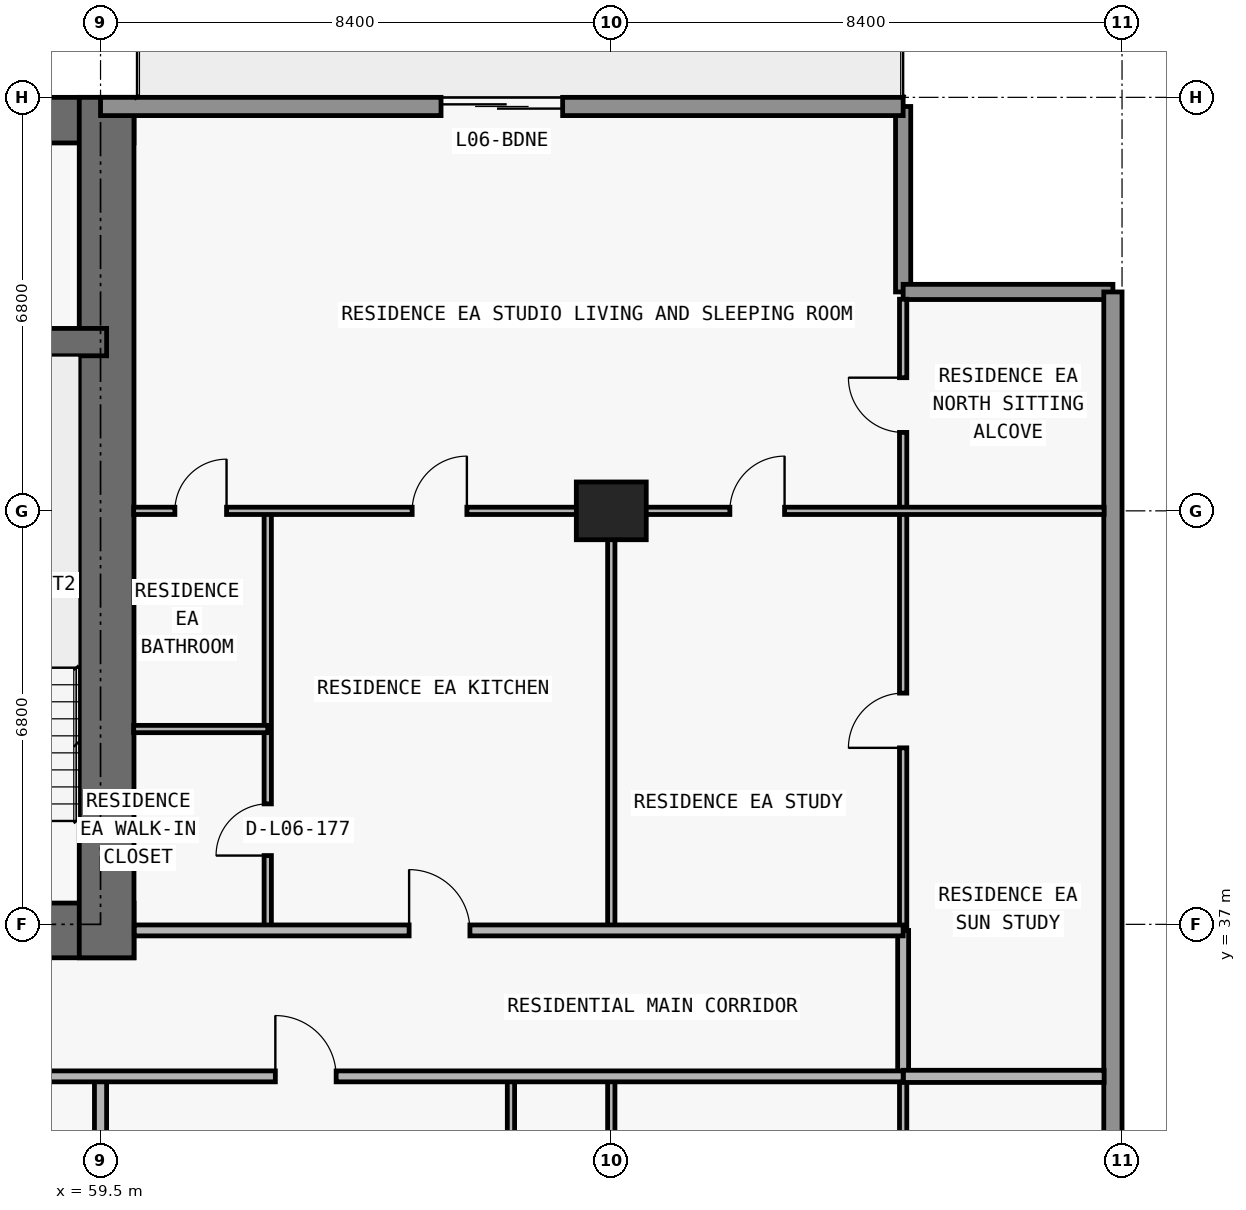
"""IFC4 building model, lengths in metres.
Left out: names, types, materials, properties, quantities, classifications, styles, units other than length and angle.
Written with IfcOpenShell. Run it as: python <this file> out.ifc"""

import sys

from ifc_helpers import new_model, si_unit, direction, frame, frame_2d, origin, origin_2d, place, context, subcontext, project, spatial, rectangle, extrude, element, fill, save


model = new_model("IFC4")
c1 = context("Model", 3, precision=1e-05, world=origin(), true_north=direction((0.0, 1.0)))
c2 = subcontext(c1, "Body", "Model", "MODEL_VIEW")
j1 = project(units=[si_unit("LENGTHUNIT", "METRE"), si_unit("PLANEANGLEUNIT", "RADIAN")], contexts=[c1])
p1 = place(None, origin())
s1 = spatial("IfcSite", under=j1, at=p1, CompositionType="ELEMENT")
p2 = place(p1, origin())
s2 = spatial("IfcBuilding", under=s1, at=p2, CompositionType="ELEMENT")
p3 = place(p2, frame((0.0, 0.0, 30.0)))
s3 = spatial("IfcBuildingStorey", under=s2, at=p3, CompositionType="ELEMENT", Elevation=30.0)
p4 = place(p3, frame((67.9, 43.8, 0.0), z_axis=(0.0, 0.0, 1.0), x_axis=(1.0, 0.0, 0.0)))
e1 = element("IfcColumn", 1, at=p4, inside=s3, PredefinedType="COLUMN", context=c2, shape_type="SweptSolid", body=[
    extrude(rectangle(XDim=1.15, YDim=0.95, at=origin_2d()), origin(), (0.0, 0.0, 1.0), 3.05),
])
p5 = place(p3, frame((17.75, 36.9, 0.0), z_axis=(0.0, 0.0, 1.0), x_axis=(1.0, 0.0, 0.0)))
e2 = element("IfcWall", 2, at=p5, inside=s3, PredefinedType="SHEAR", context=c2, shape_type="SweptSolid", body=[
    extrude(rectangle(XDim=42.3, YDim=0.9, at=frame_2d((21.15, 0.0))), origin(), (0.0, 0.0, 1.0), 3.05),
])
p6 = place(p5, frame((14.55, 0.0, 0.0)))
e3 = element("IfcOpeningElement", 3, at=p6, cuts=e2, PredefinedType="OPENING", context=c2, shape_type="SweptSolid", body=[
    extrude(rectangle(XDim=1.1, YDim=2.15, at=frame_2d((0.55, 1.075))), frame((0.0, 0.46, 0.0), z_axis=(0.0, -1.0, 0.0), x_axis=(1.0, 0.0, 0.0)), (0.0, 0.0, 1.0), 0.92),
])
p7 = place(p5, frame((6.4, 0.0, 0.0)))
e4 = element("IfcOpeningElement", 4, at=p7, cuts=e2, PredefinedType="OPENING", context=c2, shape_type="SweptSolid", body=[
    extrude(rectangle(XDim=1.05, YDim=2.15, at=frame_2d((0.525, 1.075))), frame((0.0, 0.46, 0.0), z_axis=(0.0, -1.0, 0.0), x_axis=(1.0, 0.0, 0.0)), (0.0, 0.0, 1.0), 0.92),
])
p8 = place(p5, frame((34.9, 0.0, 0.0)))
e5 = element("IfcOpeningElement", 5, at=p8, cuts=e2, PredefinedType="OPENING", context=c2, shape_type="SweptSolid", body=[
    extrude(rectangle(XDim=1.05, YDim=2.15, at=frame_2d((0.525, 1.075))), frame((0.0, 0.46, 0.0), z_axis=(0.0, -1.0, 0.0), x_axis=(1.0, 0.0, 0.0)), (0.0, 0.0, 1.0), 0.92),
])
p9 = place(p5, frame((11.012, 0.0, 0.0)))
e6 = element("IfcOpeningElement", 6, at=p9, cuts=e2, PredefinedType="OPENING", context=c2, shape_type="SweptSolid", body=[
    extrude(rectangle(XDim=1.05, YDim=2.15, at=frame_2d((0.525, 1.075))), frame((0.0, 0.46, 0.0), z_axis=(0.0, -1.0, 0.0), x_axis=(1.0, 0.0, 0.0)), (0.0, 0.0, 1.0), 0.92),
])
p10 = place(p5, frame((24.25, 0.0, 0.0)))
e7 = element("IfcOpeningElement", 7, at=p10, cuts=e2, PredefinedType="OPENING", context=c2, shape_type="SweptSolid", body=[
    extrude(rectangle(XDim=1.05, YDim=2.15, at=frame_2d((0.525, 1.075))), frame((0.0, 0.46, 0.0), z_axis=(0.0, -1.0, 0.0), x_axis=(1.0, 0.0, 0.0)), (0.0, 0.0, 1.0), 0.92),
])
p11 = place(p3, frame((17.75, 50.225, 0.0), z_axis=(0.0, 0.0, 1.0), x_axis=(1.0, 0.0, 0.0)))
e8 = element("IfcWall", 8, at=p11, inside=s3, PredefinedType="SHEAR", context=c2, shape_type="SweptSolid", body=[
    extrude(rectangle(XDim=42.3, YDim=0.75, at=frame_2d((21.15, 0.0))), origin(), (0.0, 0.0, 1.0), 3.05),
])
p12 = place(p3, frame((59.6, 36.45, 0.0), z_axis=(0.0, 0.0, 1.0), x_axis=(0.0, 1.0, 0.0)))
e9 = element("IfcWall", 9, at=p12, inside=s3, PredefinedType="SHEAR", context=c2, shape_type="SweptSolid", body=[
    extrude(rectangle(XDim=14.15, YDim=0.9, at=frame_2d((7.075, 0.0))), origin(), (0.0, 0.0, 1.0), 3.05),
])
p13 = place(p3, frame((18.2, 46.575, 0.0), z_axis=(0.0, 0.0, 1.0), x_axis=(1.0, 0.0, 0.0)))
e10 = element("IfcWall", 10, at=p13, inside=s3, PredefinedType="SHEAR", context=c2, shape_type="SweptSolid", body=[
    extrude(rectangle(XDim=41.4, YDim=0.45, at=frame_2d((20.7, 0.0))), origin(), (0.0, 0.0, 1.0), 3.05),
])
p14 = place(p13, frame((7.675, 0.0, 0.0)))
e11 = element("IfcOpeningElement", 11, at=p14, cuts=e10, PredefinedType="OPENING", context=c2, shape_type="SweptSolid", body=[
    extrude(rectangle(XDim=1.05, YDim=2.15, at=frame_2d((0.525, 1.075))), frame((0.0, 0.235, 0.0), z_axis=(0.0, -1.0, 0.0), x_axis=(1.0, 0.0, 0.0)), (0.0, 0.0, 1.0), 0.47),
])
p15 = place(p13, frame((32.725, 0.0, 0.0)))
e12 = element("IfcOpeningElement", 12, at=p15, cuts=e10, PredefinedType="OPENING", context=c2, shape_type="SweptSolid", body=[
    extrude(rectangle(XDim=1.05, YDim=2.15, at=frame_2d((0.525, 1.075))), frame((0.0, 0.235, 0.0), z_axis=(0.0, -1.0, 0.0), x_axis=(1.0, 0.0, 0.0)), (0.0, 0.0, 1.0), 0.47),
])
p16 = place(p3, frame((72.7, 50.45, 0.0), z_axis=(0.0, 0.0, 1.0), x_axis=(0.0, -1.0, 0.0)))
e13 = element("IfcWall", 13, at=p16, inside=s3, PredefinedType="ELEMENTEDWALL", context=c2, shape_type="SweptSolid", body=[
    extrude(rectangle(XDim=3.05, YDim=0.25, at=frame_2d((1.525, 0.0))), origin(), (0.0, 0.0, 1.0), 3.05),
])
p17 = place(p3, frame((72.7, 47.4, 0.0), z_axis=(0.0, 0.0, 1.0), x_axis=(1.0, 0.0, 0.0)))
e14 = element("IfcWall", 14, at=p17, inside=s3, PredefinedType="ELEMENTEDWALL", context=c2, shape_type="SweptSolid", body=[
    extrude(rectangle(XDim=3.45, YDim=0.25, at=frame_2d((1.725, 0.0))), origin(), (0.0, 0.0, 1.0), 3.05),
])
p18 = place(p3, frame((76.15, 47.4, 0.0), z_axis=(0.0, 0.0, 1.0), x_axis=(0.0, -1.0, 0.0)))
e15 = element("IfcWall", 15, at=p18, inside=s3, PredefinedType="STANDARD", context=c2, shape_type="SweptSolid", body=[
    extrude(rectangle(XDim=20.6, YDim=0.3, at=frame_2d((10.3, 0.0))), origin(), (0.0, 0.0, 1.0), 3.05),
])
p19 = place(p3, frame((59.5, 50.45, 0.0), z_axis=(0.0, 0.0, 1.0), x_axis=(1.0, 0.0, 0.0)))
e16 = element("IfcWall", 16, at=p19, inside=s3, PredefinedType="STANDARD", context=c2, shape_type="SweptSolid", body=[
    extrude(rectangle(XDim=13.2, YDim=0.3, at=frame_2d((6.6, 0.0))), origin(), (0.0, 0.0, 1.0), 3.05),
])
p20 = place(p19, frame((5.6, 0.0, 0.0)))
e17 = element("IfcOpeningElement", 17, at=p20, cuts=e16, PredefinedType="OPENING", context=c2, shape_type="SweptSolid", body=[
    extrude(rectangle(XDim=2.0, YDim=2.3, at=frame_2d((1.0, 1.15))), frame((0.0, 0.16, 0.0), z_axis=(0.0, -1.0, 0.0), x_axis=(1.0, 0.0, 0.0)), (0.0, 0.0, 1.0), 0.32),
])
p21 = place(p3, frame((59.5, 27.64, 0.0), z_axis=(0.0, 0.0, 1.0), x_axis=(0.0, 1.0, 0.0)))
e18 = element("IfcWall", 18, at=p21, inside=s3, PredefinedType="PARTITIONING", context=c2, shape_type="SweptSolid", body=[
    extrude(rectangle(XDim=6.86, YDim=0.2, at=frame_2d((3.43, 0.0))), origin(), (0.0, 0.0, 1.0), 2.11),
])
p22 = place(p3, frame((62.25, 36.9, 0.0), z_axis=(0.0, 0.0, 1.0), x_axis=(0.0, 1.0, 0.0)))
e19 = element("IfcWall", 19, at=p22, inside=s3, PredefinedType="PARTITIONING", context=c2, shape_type="SweptSolid", body=[
    extrude(rectangle(XDim=6.9, YDim=0.12, at=frame_2d((3.45, 0.0))), origin(), (0.0, 0.0, 1.0), 3.05),
])
p23 = place(p22, frame((1.231, 0.0, 0.0)))
e20 = element("IfcOpeningElement", 20, at=p23, cuts=e19, PredefinedType="OPENING", context=c2, shape_type="SweptSolid", body=[
    extrude(rectangle(XDim=0.85, YDim=2.1, at=frame_2d((0.425, 1.05))), frame((0.0, 0.07, 0.0), z_axis=(0.0, -1.0, 0.0), x_axis=(1.0, 0.0, 0.0)), (0.0, 0.0, 1.0), 0.14),
])
p24 = place(p3, frame((66.25, 27.64, 0.0), z_axis=(0.0, 0.0, 1.0), x_axis=(0.0, 1.0, 0.0)))
e21 = element("IfcWall", 21, at=p24, inside=s3, PredefinedType="PARTITIONING", context=c2, shape_type="SweptSolid", body=[
    extrude(rectangle(XDim=6.86, YDim=0.12, at=frame_2d((3.43, 0.0))), origin(), (0.0, 0.0, 1.0), 3.05),
])
p25 = place(p24, frame((3.005, 0.0, 0.0)))
e22 = element("IfcOpeningElement", 22, at=p25, cuts=e21, PredefinedType="OPENING", context=c2, shape_type="SweptSolid", body=[
    extrude(rectangle(XDim=0.85, YDim=2.1, at=frame_2d((0.425, 1.05))), frame((0.0, 0.07, 0.0), z_axis=(0.0, -1.0, 0.0), x_axis=(1.0, 0.0, 0.0)), (0.0, 0.0, 1.0), 0.14),
])
p26 = place(p3, frame((67.9, 27.64, 0.0), z_axis=(0.0, 0.0, 1.0), x_axis=(0.0, 1.0, 0.0)))
e23 = element("IfcWall", 23, at=p26, inside=s3, PredefinedType="PARTITIONING", context=c2, shape_type="SweptSolid", body=[
    extrude(rectangle(XDim=6.86, YDim=0.12, at=frame_2d((3.43, 0.0))), origin(), (0.0, 0.0, 1.0), 2.11),
])
p27 = place(p3, frame((67.9, 36.9, 0.0), z_axis=(0.0, 0.0, 1.0), x_axis=(0.0, 1.0, 0.0)))
e24 = element("IfcWall", 24, at=p27, inside=s3, PredefinedType="PARTITIONING", context=c2, shape_type="SweptSolid", body=[
    extrude(rectangle(XDim=6.9, YDim=0.12, at=frame_2d((3.45, 0.0))), origin(), (0.0, 0.0, 1.0), 2.11),
])
p28 = place(p3, frame((72.7, 27.64, 0.0), z_axis=(0.0, 0.0, 1.0), x_axis=(0.0, 1.0, 0.0)))
e25 = element("IfcWall", 25, at=p28, inside=s3, PredefinedType="PARTITIONING", context=c2, shape_type="SweptSolid", body=[
    extrude(rectangle(XDim=6.86, YDim=0.12, at=frame_2d((3.43, 0.0))), origin(), (0.0, 0.0, 1.0), 3.05),
])
p29 = place(p3, frame((72.7, 34.505, 0.0), z_axis=(0.0, 0.0, 1.0), x_axis=(0.0, 1.0, 0.0)))
e26 = element("IfcWall", 26, at=p29, inside=s3, PredefinedType="PARTITIONING", context=c2, shape_type="SweptSolid", body=[
    extrude(rectangle(XDim=2.395, YDim=0.18, at=frame_2d((1.198, 0.0))), origin(), (0.0, 0.0, 1.0), 3.05),
])
p30 = place(p3, frame((72.7, 36.905, 0.0), z_axis=(0.0, 0.0, 1.0), x_axis=(0.0, 1.0, 0.0)))
e27 = element("IfcWall", 27, at=p30, inside=s3, PredefinedType="PARTITIONING", context=c2, shape_type="SweptSolid", body=[
    extrude(rectangle(XDim=10.375, YDim=0.12, at=frame_2d((5.188, 0.0))), origin(), (0.0, 0.0, 1.0), 3.05),
])
p31 = place(p30, frame((2.998, 0.0, 0.0)))
e28 = element("IfcOpeningElement", 28, at=p31, cuts=e27, PredefinedType="OPENING", context=c2, shape_type="SweptSolid", body=[
    extrude(rectangle(XDim=0.9, YDim=2.15, at=frame_2d((0.45, 1.075))), frame((0.0, 0.07, 0.0), z_axis=(0.0, -1.0, 0.0), x_axis=(1.0, 0.0, 0.0)), (0.0, 0.0, 1.0), 0.14),
])
p32 = place(p30, frame((8.185, 0.0, 0.0)))
e29 = element("IfcOpeningElement", 29, at=p32, cuts=e27, PredefinedType="OPENING", context=c2, shape_type="SweptSolid", body=[
    extrude(rectangle(XDim=0.9, YDim=2.15, at=frame_2d((0.45, 1.075))), frame((0.0, 0.07, 0.0), z_axis=(0.0, -1.0, 0.0), x_axis=(1.0, 0.0, 0.0)), (0.0, 0.0, 1.0), 0.14),
])
p33 = place(p3, frame((55.9, 34.5, 0.0), z_axis=(0.0, 0.0, 1.0), x_axis=(1.0, 0.0, 0.0)))
e30 = element("IfcWall", 30, at=p33, inside=s3, PredefinedType="PARTITIONING", context=c2, shape_type="SweptSolid", body=[
    extrude(rectangle(XDim=16.8, YDim=0.18, at=frame_2d((8.4, 0.0))), origin(), (0.0, 0.0, 1.0), 3.05),
])
p34 = place(p33, frame((6.475, 0.0, 0.0)))
e31 = element("IfcOpeningElement", 31, at=p34, cuts=e30, PredefinedType="OPENING", context=c2, shape_type="SweptSolid", body=[
    extrude(rectangle(XDim=1.0, YDim=2.2, at=frame_2d((0.5, 1.1))), frame((0.0, 0.1, 0.0), z_axis=(0.0, -1.0, 0.0), x_axis=(1.0, 0.0, 0.0)), (0.0, 0.0, 1.0), 0.2),
])
p35 = place(p3, frame((72.705, 34.5, 0.0), z_axis=(0.0, 0.0, 1.0), x_axis=(1.0, 0.0, 0.0)))
e32 = element("IfcWall", 32, at=p35, inside=s3, PredefinedType="PARTITIONING", context=c2, shape_type="SweptSolid", body=[
    extrude(rectangle(XDim=3.3, YDim=0.2, at=frame_2d((1.65, 0.0))), origin(), (0.0, 0.0, 1.0), 3.05),
])
p36 = place(p3, frame((60.055, 36.9, 0.0), z_axis=(0.0, 0.0, 1.0), x_axis=(1.0, 0.0, 0.0)))
e33 = element("IfcWall", 33, at=p36, inside=s3, PredefinedType="PARTITIONING", context=c2, shape_type="SweptSolid", body=[
    extrude(rectangle(XDim=12.645, YDim=0.18, at=frame_2d((6.323, 0.0))), origin(), (0.0, 0.0, 1.0), 3.05),
])
p37 = place(p36, frame((4.52, 0.0, 0.0)))
e34 = element("IfcOpeningElement", 34, at=p37, cuts=e33, PredefinedType="OPENING", context=c2, shape_type="SweptSolid", body=[
    extrude(rectangle(XDim=1.0, YDim=2.2, at=frame_2d((0.5, 1.1))), frame((0.0, 0.1, 0.0), z_axis=(0.0, -1.0, 0.0), x_axis=(1.0, 0.0, 0.0)), (0.0, 0.0, 1.0), 0.2),
])
p38 = place(p3, frame((60.045, 40.212, 0.0), z_axis=(0.0, 0.0, 1.0), x_axis=(1.0, 0.0, 0.0)))
e35 = element("IfcWall", 35, at=p38, inside=s3, PredefinedType="PARTITIONING", context=c2, shape_type="SweptSolid", body=[
    extrude(rectangle(XDim=2.205, YDim=0.12, at=frame_2d((1.103, 0.0))), origin(), (0.0, 0.0, 1.0), 3.05),
])
p39 = place(p3, frame((60.045, 43.8, 0.0), z_axis=(0.0, 0.0, 1.0), x_axis=(1.0, 0.0, 0.0)))
e36 = element("IfcWall", 36, at=p39, inside=s3, PredefinedType="PARTITIONING", context=c2, shape_type="SweptSolid", body=[
    extrude(rectangle(XDim=15.96, YDim=0.12, at=frame_2d((7.98, 0.0))), origin(), (0.0, 0.0, 1.0), 2.339),
])
p40 = place(p39, frame((9.805, 0.0, 0.0)))
e37 = element("IfcOpeningElement", 37, at=p40, cuts=e36, PredefinedType="OPENING", context=c2, shape_type="SweptSolid", body=[
    extrude(rectangle(XDim=0.9, YDim=2.15, at=frame_2d((0.45, 1.075))), frame((0.0, 0.07, 0.0), z_axis=(0.0, -1.0, 0.0), x_axis=(1.0, 0.0, 0.0)), (0.0, 0.0, 1.0), 0.14),
])
p41 = place(p39, frame((4.58, 0.0, 0.0)))
e38 = element("IfcOpeningElement", 38, at=p41, cuts=e36, PredefinedType="OPENING", context=c2, shape_type="SweptSolid", body=[
    extrude(rectangle(XDim=0.9, YDim=2.15, at=frame_2d((0.45, 1.075))), frame((0.0, 0.07, 0.0), z_axis=(0.0, -1.0, 0.0), x_axis=(1.0, 0.0, 0.0)), (0.0, 0.0, 1.0), 0.14),
])
p42 = place(p39, frame((0.677, 0.0, 0.0)))
e39 = element("IfcOpeningElement", 39, at=p42, cuts=e36, PredefinedType="OPENING", context=c2, shape_type="SweptSolid", body=[
    extrude(rectangle(XDim=0.85, YDim=2.1, at=frame_2d((0.425, 1.05))), frame((0.0, 0.07, 0.0), z_axis=(0.0, -1.0, 0.0), x_axis=(1.0, 0.0, 0.0)), (0.0, 0.0, 1.0), 0.14),
])
p43 = place(p20, origin())
e40 = element("IfcDoor", 40, at=p43, inside=s3, OperationType="DOUBLE_DOOR_SLIDING", PredefinedType="DOOR", context=c2, shape_type="SweptSolid", body=[
    extrude(rectangle(XDim=2.0, YDim=2.3, at=frame_2d((1.0, 1.15))), frame((0.0, 0.025, 0.0), z_axis=(0.0, -1.0, 0.0), x_axis=(1.0, 0.0, 0.0)), (0.0, 0.0, 1.0), 0.05),
])
fill(e17, e40)
p44 = place(p34, origin())
e41 = element("IfcDoor", 41, at=p44, inside=s3, OperationType="SINGLE_SWING_LEFT", PredefinedType="DOOR", context=c2, shape_type="SweptSolid", body=[
    extrude(rectangle(XDim=1.0, YDim=2.2, at=frame_2d((0.5, 1.1))), frame((0.0, 0.025, 0.0), z_axis=(0.0, -1.0, 0.0), x_axis=(1.0, 0.0, 0.0)), (0.0, 0.0, 1.0), 0.05),
])
fill(e31, e41)
p45 = place(p40, origin())
e42 = element("IfcDoor", 42, at=p45, inside=s3, OperationType="SINGLE_SWING_RIGHT", PredefinedType="DOOR", context=c2, shape_type="SweptSolid", body=[
    extrude(rectangle(XDim=0.9, YDim=2.15, at=frame_2d((0.45, 1.075))), frame((0.0, 0.025, 0.0), z_axis=(0.0, -1.0, 0.0), x_axis=(1.0, 0.0, 0.0)), (0.0, 0.0, 1.0), 0.05),
])
fill(e37, e42)
p46 = place(p37, origin())
e43 = element("IfcDoor", 43, at=p46, inside=s3, OperationType="SINGLE_SWING_LEFT", PredefinedType="DOOR", context=c2, shape_type="SweptSolid", body=[
    extrude(rectangle(XDim=1.0, YDim=2.2, at=frame_2d((0.5, 1.1))), frame((0.0, 0.025, 0.0), z_axis=(0.0, -1.0, 0.0), x_axis=(1.0, 0.0, 0.0)), (0.0, 0.0, 1.0), 0.05),
])
fill(e34, e43)
p47 = place(p41, origin())
e44 = element("IfcDoor", 44, at=p47, inside=s3, OperationType="SINGLE_SWING_RIGHT", PredefinedType="DOOR", context=c2, shape_type="SweptSolid", body=[
    extrude(rectangle(XDim=0.9, YDim=2.15, at=frame_2d((0.45, 1.075))), frame((0.0, 0.025, 0.0), z_axis=(0.0, -1.0, 0.0), x_axis=(1.0, 0.0, 0.0)), (0.0, 0.0, 1.0), 0.05),
])
fill(e38, e44)
p48 = place(p23, origin())
e45 = element("IfcDoor", 45, at=p48, inside=s3, OperationType="SINGLE_SWING_LEFT", PredefinedType="DOOR", context=c2, shape_type="SweptSolid", body=[
    extrude(rectangle(XDim=0.85, YDim=2.1, at=frame_2d((0.425, 1.05))), frame((0.0, 0.025, 0.0), z_axis=(0.0, -1.0, 0.0), x_axis=(1.0, 0.0, 0.0)), (0.0, 0.0, 1.0), 0.05),
])
fill(e20, e45)
p49 = place(p42, origin())
e46 = element("IfcDoor", 46, at=p49, inside=s3, OperationType="SINGLE_SWING_RIGHT", PredefinedType="DOOR", context=c2, shape_type="SweptSolid", body=[
    extrude(rectangle(XDim=0.85, YDim=2.1, at=frame_2d((0.425, 1.05))), frame((0.0, 0.025, 0.0), z_axis=(0.0, -1.0, 0.0), x_axis=(1.0, 0.0, 0.0)), (0.0, 0.0, 1.0), 0.05),
])
fill(e39, e46)
p50 = place(p31, origin())
e47 = element("IfcDoor", 47, at=p50, inside=s3, OperationType="SINGLE_SWING_LEFT", PredefinedType="DOOR", context=c2, shape_type="SweptSolid", body=[
    extrude(rectangle(XDim=0.9, YDim=2.15, at=frame_2d((0.45, 1.075))), frame((0.0, 0.025, 0.0), z_axis=(0.0, -1.0, 0.0), x_axis=(1.0, 0.0, 0.0)), (0.0, 0.0, 1.0), 0.05),
])
fill(e28, e47)
p51 = place(p32, origin())
e48 = element("IfcDoor", 48, at=p51, inside=s3, OperationType="SINGLE_SWING_RIGHT", PredefinedType="DOOR", context=c2, shape_type="SweptSolid", body=[
    extrude(rectangle(XDim=0.9, YDim=2.15, at=frame_2d((0.45, 1.075))), frame((0.0, 0.025, 0.0), z_axis=(0.0, -1.0, 0.0), x_axis=(1.0, 0.0, 0.0)), (0.0, 0.0, 1.0), 0.05),
])
fill(e29, e48)
save(model, sys.argv[1])
